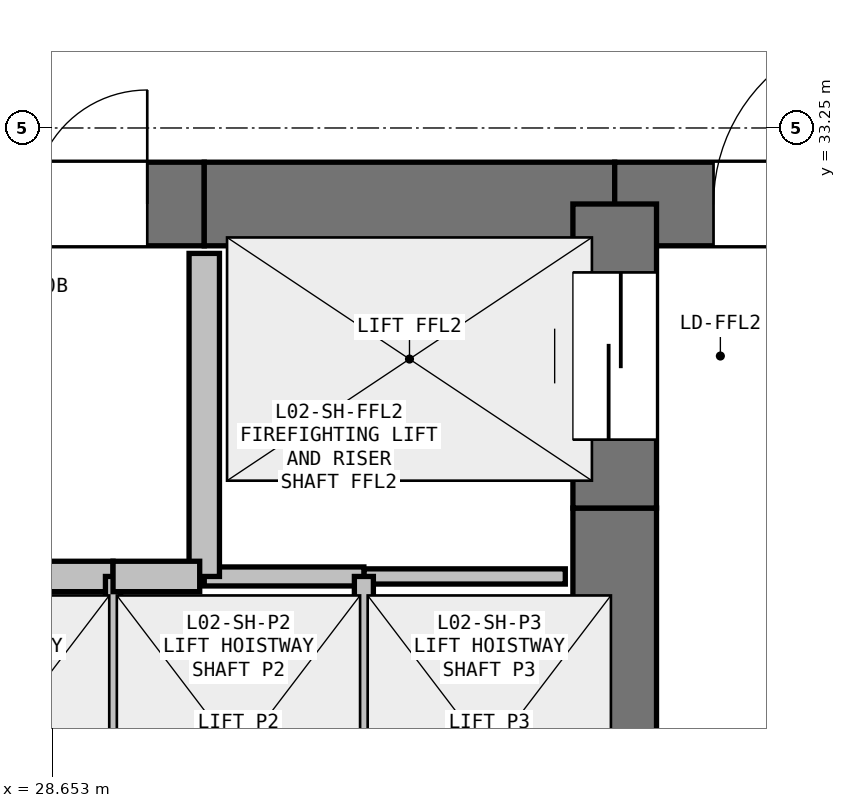
"""IFC4 building model, lengths in metres.
Left out: names, types, materials, properties, quantities, classifications, styles, units other than length and angle.
Written with IfcOpenShell. Run it as: python <this file> out.ifc"""

import sys

from ifc_helpers import new_model, si_unit, direction, frame, frame_2d, origin, place, context, subcontext, project, spatial, rectangle, extrude, element, fill, save


model = new_model("IFC4")
c1 = context("Model", 3, precision=1e-05, world=origin(), true_north=direction((0.0, 1.0)))
c2 = subcontext(c1, "Body", "Model", "MODEL_VIEW")
j1 = project(units=[si_unit("LENGTHUNIT", "METRE"), si_unit("PLANEANGLEUNIT", "RADIAN")], contexts=[c1])
p1 = place(None, origin())
s1 = spatial("IfcSite", under=j1, at=p1, CompositionType="ELEMENT")
p2 = place(p1, origin())
s2 = spatial("IfcBuilding", under=s1, at=p2, CompositionType="ELEMENT")
p3 = place(p2, frame((0.0, 0.0, 9.6)))
s3 = spatial("IfcBuildingStorey", under=s2, at=p3, CompositionType="ELEMENT", Elevation=9.6)
p4 = place(p3, frame((27.4, 32.75, 0.0), z_axis=(0.0, 0.0, 1.0), x_axis=(1.0, 0.0, 0.0)))
e1 = element("IfcWall", 1, at=p4, inside=s3, PredefinedType="SHEAR", context=c2, shape_type="SweptSolid", body=[
    extrude(rectangle(XDim=2.25, YDim=0.55, at=frame_2d((1.125, 0.0))), origin(), (0.0, 0.0, 1.0), 4.48),
])
p5 = place(p4, frame((0.375, 0.0, 0.0)))
e2 = element("IfcOpeningElement", 2, at=p5, cuts=e1, PredefinedType="OPENING", context=c2, shape_type="SweptSolid", body=[
    extrude(rectangle(XDim=1.5, YDim=2.2, at=frame_2d((0.75, 1.1))), frame((0.0, 0.285, 0.0), z_axis=(0.0, -1.0, 0.0), x_axis=(1.0, 0.0, 0.0)), (0.0, 0.0, 1.0), 0.57),
])
p6 = place(p3, frame((29.65, 32.75, 0.0), z_axis=(0.0, 0.0, 1.0), x_axis=(1.0, 0.0, 0.0)))
e3 = element("IfcWall", 3, at=p6, inside=s3, PredefinedType="SHEAR", context=c2, shape_type="SweptSolid", body=[
    extrude(rectangle(XDim=2.7, YDim=0.55, at=frame_2d((1.35, 0.0))), origin(), (0.0, 0.0, 1.0), 4.48),
])
p7 = place(p3, frame((32.35, 32.75, 0.0), z_axis=(0.0, 0.0, 1.0), x_axis=(1.0, 0.0, 0.0)))
e4 = element("IfcWall", 4, at=p7, inside=s3, PredefinedType="SHEAR", context=c2, shape_type="SweptSolid", body=[
    extrude(rectangle(XDim=3.45, YDim=0.55, at=frame_2d((1.725, 0.0))), origin(), (0.0, 0.0, 1.0), 4.48),
])
p8 = place(p7, frame((0.65, 0.0, 0.0)))
e5 = element("IfcOpeningElement", 5, at=p8, cuts=e4, PredefinedType="OPENING", context=c2, shape_type="SweptSolid", body=[
    extrude(rectangle(XDim=1.15, YDim=2.15, at=frame_2d((0.575, 1.075))), frame((0.0, 0.285, 0.0), z_axis=(0.0, -1.0, 0.0), x_axis=(1.0, 0.0, 0.0)), (0.0, 0.0, 1.0), 0.57),
])
p9 = place(p3, frame((32.35, 27.95, 0.0), z_axis=(0.0, 0.0, 1.0), x_axis=(0.0, 1.0, 0.0)))
e6 = element("IfcWall", 6, at=p9, inside=s3, PredefinedType="SHEAR", context=c2, shape_type="SweptSolid", body=[
    extrude(rectangle(XDim=2.8, YDim=0.55, at=frame_2d((1.4, 0.0))), origin(), (0.0, 0.0, 1.0), 4.48),
])
p10 = place(p3, frame((32.35, 30.75, 0.0), z_axis=(0.0, 0.0, 1.0), x_axis=(0.0, 1.0, 0.0)))
e7 = element("IfcWall", 7, at=p10, inside=s3, PredefinedType="SHEAR", context=c2, shape_type="SweptSolid", body=[
    extrude(rectangle(XDim=2.0, YDim=0.55, at=frame_2d((1.0, 0.0))), origin(), (0.0, 0.0, 1.0), 4.48),
])
p11 = place(p10, frame((0.45, 0.0, 0.0)))
e8 = element("IfcOpeningElement", 8, at=p11, cuts=e7, PredefinedType="OPENING", context=c2, shape_type="SweptSolid", body=[
    extrude(rectangle(XDim=1.1, YDim=2.15, at=frame_2d((0.55, 1.075))), frame((0.0, 0.285, 0.0), z_axis=(0.0, -1.0, 0.0), x_axis=(1.0, 0.0, 0.0)), (0.0, 0.0, 1.0), 0.57),
])
p12 = place(p3, frame((32.025, 30.3, 0.0), z_axis=(0.0, 0.0, 1.0), x_axis=(-1.0, 0.0, 0.0)))
e9 = element("IfcWall", 9, at=p12, inside=s3, PredefinedType="PARTITIONING", context=c2, shape_type="SweptSolid", body=[
    extrude(rectangle(XDim=1.325, YDim=0.1, at=frame_2d((0.663, 0.0))), origin(), (0.0, 0.0, 1.0), 4.48),
])
p13 = place(p3, frame((30.7, 30.3, 0.0), z_axis=(0.0, 0.0, 1.0), x_axis=(-1.0, 0.0, 0.0)))
e10 = element("IfcWall", 10, at=p13, inside=s3, PredefinedType="PARTITIONING", context=c2, shape_type="SweptSolid", body=[
    extrude(rectangle(XDim=1.05, YDim=0.125, at=frame_2d((0.525, 0.0))), origin(), (0.0, 0.0, 1.0), 4.48),
])
p14 = place(p3, frame((29.65, 30.3, 0.0), z_axis=(0.0, 0.0, 1.0), x_axis=(0.0, 1.0, 0.0)))
e11 = element("IfcWall", 11, at=p14, inside=s3, PredefinedType="PARTITIONING", context=c2, shape_type="SweptSolid", body=[
    extrude(rectangle(XDim=2.125, YDim=0.2, at=frame_2d((1.062, 0.0))), origin(), (0.0, 0.0, 1.0), 4.48),
])
p15 = place(p3, frame((27.4, 30.3, 0.0), z_axis=(0.0, 0.0, 1.0), x_axis=(1.0, 0.0, 0.0)))
e12 = element("IfcWall", 12, at=p15, inside=s3, PredefinedType="PARTITIONING", context=c2, shape_type="SweptSolid", body=[
    extrude(rectangle(XDim=1.65, YDim=0.2, at=frame_2d((0.825, 0.0))), origin(), (0.0, 0.0, 1.0), 4.48),
])
p16 = place(p3, frame((29.05, 30.3, 0.0), z_axis=(0.0, 0.0, 1.0), x_axis=(0.0, -1.0, 0.0)))
e13 = element("IfcWall", 13, at=p16, inside=s3, PredefinedType="PARTITIONING", context=c2, shape_type="SweptSolid", body=[
    extrude(rectangle(XDim=2.2, YDim=0.1, at=frame_2d((1.1, 0.0))), origin(), (0.0, 0.0, 1.0), 4.48),
])
p17 = place(p3, frame((29.05, 30.3, 0.0), z_axis=(0.0, 0.0, 1.0), x_axis=(1.0, 0.0, 0.0)))
e14 = element("IfcWall", 14, at=p17, inside=s3, PredefinedType="PARTITIONING", context=c2, shape_type="SweptSolid", body=[
    extrude(rectangle(XDim=0.57, YDim=0.2, at=frame_2d((0.285, 0.0))), origin(), (0.0, 0.0, 1.0), 4.48),
])
p18 = place(p3, frame((30.7, 30.3, 0.0), z_axis=(0.0, 0.0, 1.0), x_axis=(0.0, -1.0, 0.0)))
e15 = element("IfcWall", 15, at=p18, inside=s3, PredefinedType="PARTITIONING", context=c2, shape_type="SweptSolid", body=[
    extrude(rectangle(XDim=2.2, YDim=0.125, at=frame_2d((1.1, 0.0))), origin(), (0.0, 0.0, 1.0), 4.48),
])
p19 = place(p11, origin())
e16 = element("IfcDoor", 16, at=p19, inside=s3, OperationType="SLIDING_TO_LEFT", PredefinedType="DOOR", context=c2, shape_type="SweptSolid", body=[
    extrude(rectangle(XDim=1.1, YDim=2.15, at=frame_2d((0.55, 1.075))), frame((0.0, 0.025, 0.0), z_axis=(0.0, -1.0, 0.0), x_axis=(1.0, 0.0, 0.0)), (0.0, 0.0, 1.0), 0.05),
])
fill(e8, e16)
p20 = place(p8, origin())
e17 = element("IfcDoor", 17, at=p20, inside=s3, OperationType="SINGLE_SWING_RIGHT", PredefinedType="DOOR", context=c2, shape_type="SweptSolid", body=[
    extrude(rectangle(XDim=1.15, YDim=2.15, at=frame_2d((0.575, 1.075))), frame((0.0, 0.025, 0.0), z_axis=(0.0, -1.0, 0.0), x_axis=(1.0, 0.0, 0.0)), (0.0, 0.0, 1.0), 0.05),
])
fill(e5, e17)
p21 = place(p5, origin())
e18 = element("IfcDoor", 18, at=p21, inside=s3, OperationType="DOUBLE_DOOR_SINGLE_SWING", PredefinedType="DOOR", context=c2, shape_type="SweptSolid", body=[
    extrude(rectangle(XDim=1.5, YDim=2.2, at=frame_2d((0.75, 1.1))), frame((0.0, 0.025, 0.0), z_axis=(0.0, -1.0, 0.0), x_axis=(1.0, 0.0, 0.0)), (0.0, 0.0, 1.0), 0.05),
])
fill(e2, e18)
save(model, sys.argv[1])
